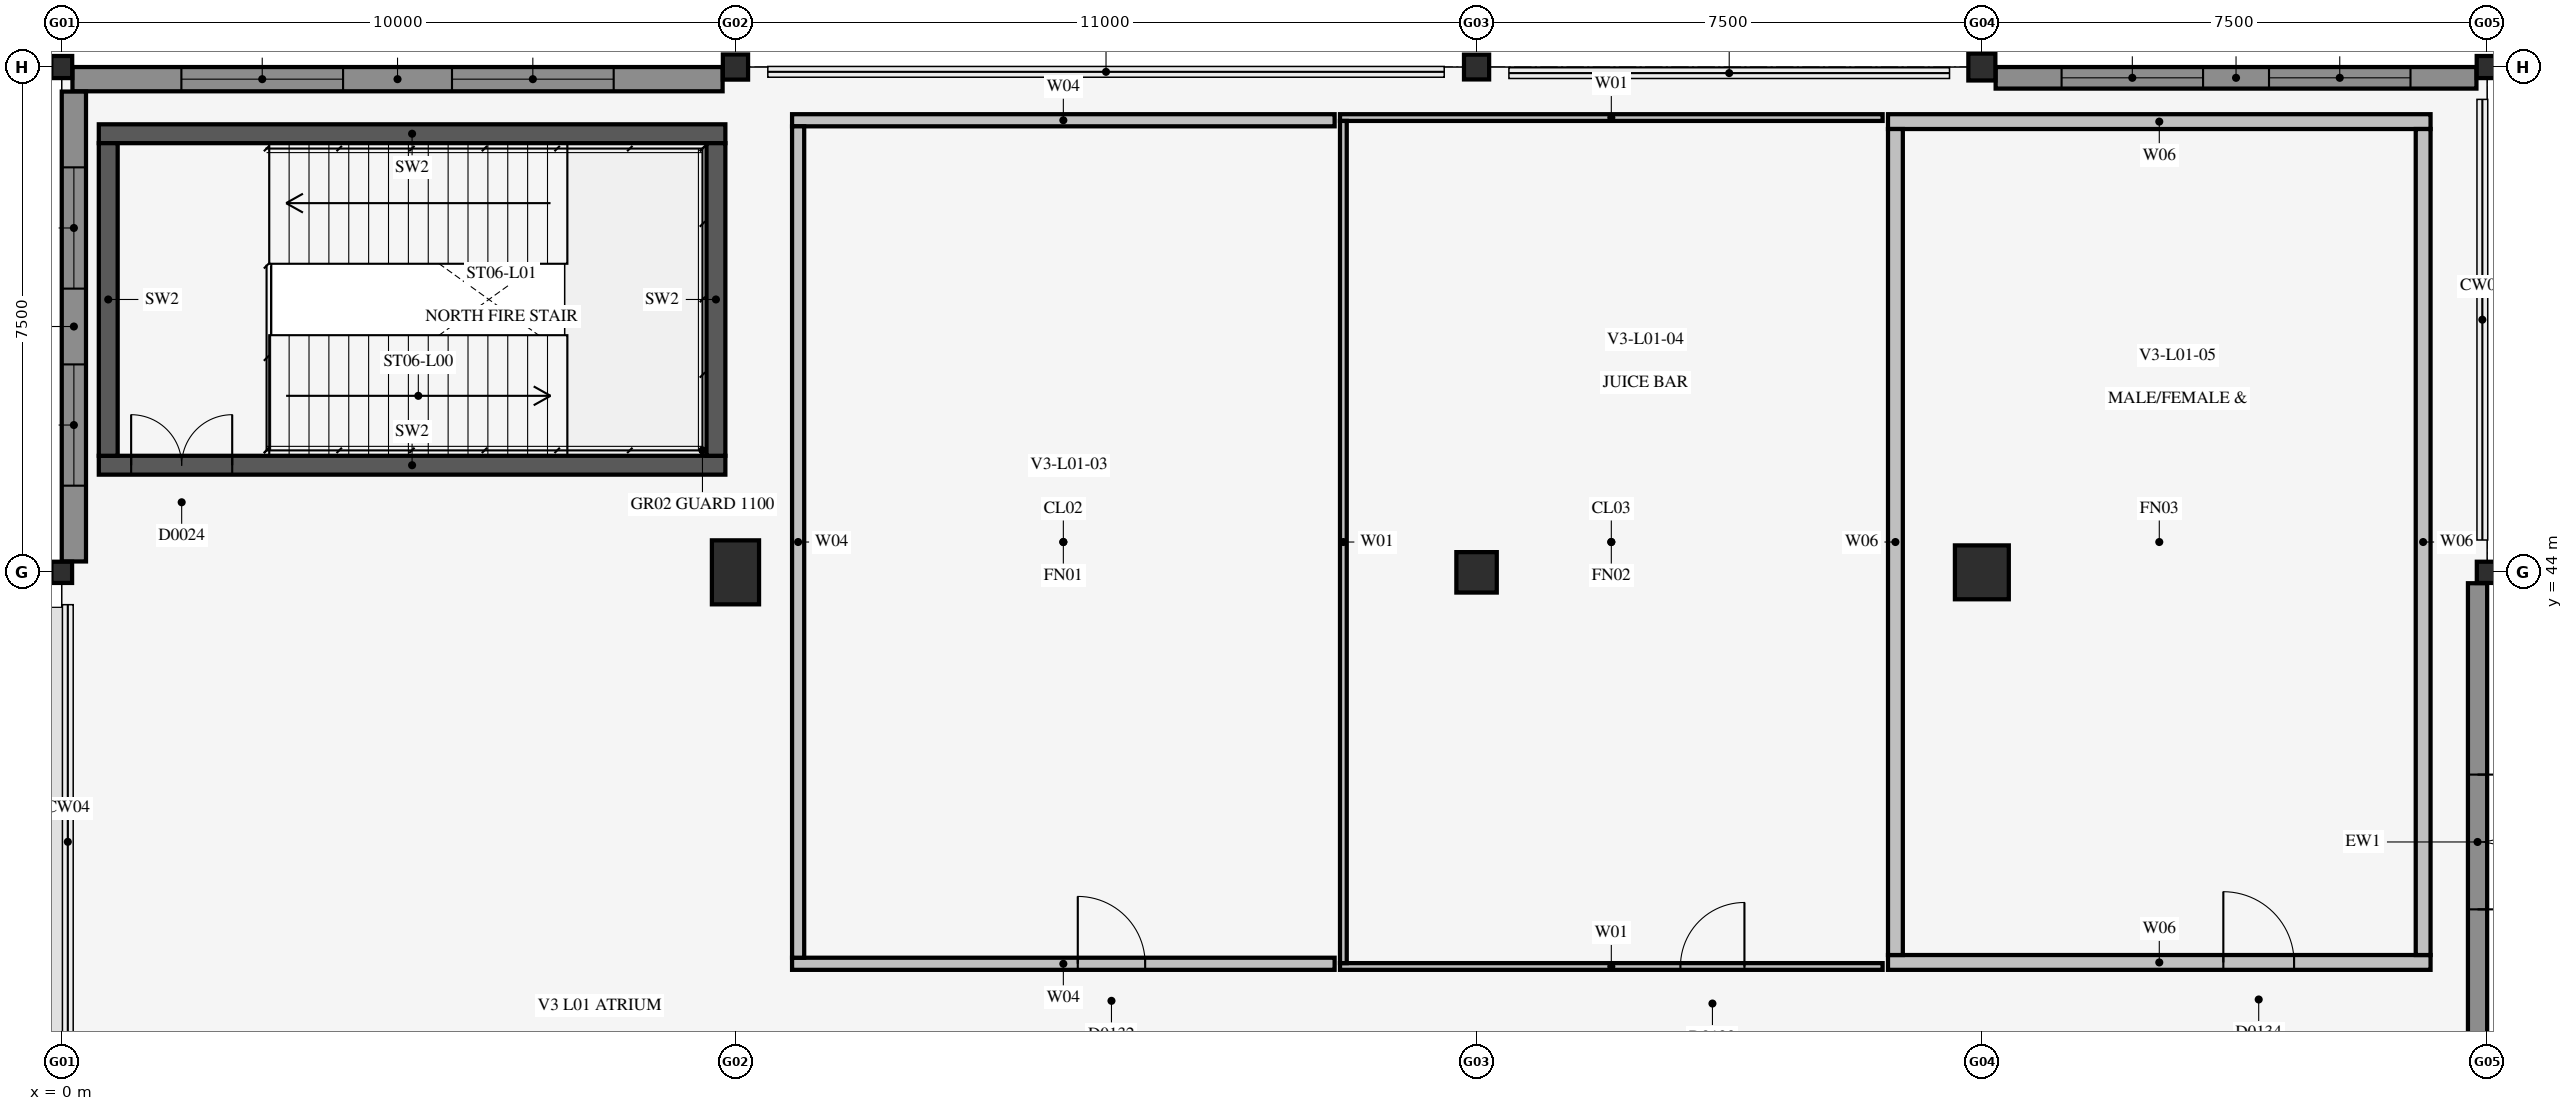
"""IFC4 building model, lengths in metres.
Left out: names, types, materials, properties, quantities, classifications, styles, units other than length and angle.
Written with IfcOpenShell. Run it as: python <this file> out.ifc"""

import sys

from ifc_helpers import new_model, si_unit, direction, frame, frame_2d, origin, origin_2d, place, context, subcontext, project, spatial, rectangle, circle, i_section, extrude, element, fill, save


model = new_model("IFC4")
c1 = context("Model", 3, precision=1e-05, world=origin(), true_north=direction((0.0, 1.0)))
c2 = subcontext(c1, "Body", "Model", "MODEL_VIEW")
j1 = project(units=[si_unit("LENGTHUNIT", "METRE"), si_unit("PLANEANGLEUNIT", "RADIAN")], contexts=[c1])
p1 = place(None, origin())
s1 = spatial("IfcSite", under=j1, at=p1, CompositionType="ELEMENT")
p2 = place(p1, origin())
s2 = spatial("IfcBuilding", under=s1, at=p2, CompositionType="ELEMENT")
p3 = place(p2, frame((0.0, 0.0, 5.4)))
s3 = spatial("IfcBuildingStorey", under=s2, at=p3, CompositionType="ELEMENT", Elevation=5.4)
p4 = place(p3, frame((0.55, 45.59, 0.0), z_axis=(0.0, 0.0, 1.0), x_axis=(1.0, 0.0, 0.0)))
e1 = element("IfcWall", 1, at=p4, inside=s3, PredefinedType="SHEAR", context=c2, shape_type="SweptSolid", body=[
    extrude(rectangle(XDim=9.3, YDim=0.28, at=frame_2d((4.65, 0.0))), origin(), (0.0, 0.0, 1.0), 4.635),
])
p5 = place(p4, frame((0.48, 0.0, 0.0)))
e2 = element("IfcOpeningElement", 2, at=p5, cuts=e1, PredefinedType="OPENING", context=c2, shape_type="SweptSolid", body=[
    extrude(rectangle(XDim=1.5, YDim=2.3, at=frame_2d((0.75, 1.15))), frame((0.0, 0.152, 0.0), z_axis=(0.0, -1.0, 0.0), x_axis=(1.0, 0.0, 0.0)), (0.0, 0.0, 1.0), 0.304),
])
p6 = place(p3, frame((0.55, 50.51, 0.0), z_axis=(0.0, 0.0, 1.0), x_axis=(1.0, 0.0, 0.0)))
e3 = element("IfcWall", 3, at=p6, inside=s3, PredefinedType="SHEAR", context=c2, shape_type="SweptSolid", body=[
    extrude(rectangle(XDim=9.3, YDim=0.28, at=frame_2d((4.65, 0.0))), origin(), (0.0, 0.0, 1.0), 4.635),
])
for number, where, z_axis, x_axis in (
    (4, (0.69, 45.73, 0.0), (0.0, 0.0, 1.0), (0.0, 1.0, 0.0)),
    (5, (9.71, 45.73, 0.0), (0.0, 0.0, 1.0), (0.0, 1.0, 0.0)),
):
    element("IfcWall", number, at=place(p3, frame(where, z_axis=z_axis, x_axis=x_axis)), inside=s3, PredefinedType="SHEAR", context=c2, shape_type="SweptSolid", body=[
        extrude(rectangle(XDim=4.64, YDim=0.28, at=frame_2d((2.32, 0.0))), origin(), (0.0, 0.0, 1.0), 4.635),
    ])
p7 = place(p3, frame((0.0, 44.0, 0.0), z_axis=(0.0, 0.0, 1.0), x_axis=(1.0, 0.0, 0.0)))
e6 = element("IfcColumn", 6, at=p7, inside=s3, PredefinedType="COLUMN", context=c2, shape_type="SweptSolid", body=[
    extrude(i_section(OverallWidth=0.307, OverallDepth=0.315, WebThickness=0.012, FlangeThickness=0.019, FilletRadius=0.014, at=origin_2d()), origin(), (0.0, 0.0, 1.0), 4.6),
])
p8 = place(p3, frame((0.0, 51.5, 0.0), z_axis=(0.0, 0.0, 1.0), x_axis=(1.0, 0.0, 0.0)))
e7 = element("IfcColumn", 7, at=p8, inside=s3, PredefinedType="COLUMN", context=c2, shape_type="SweptSolid", body=[
    extrude(i_section(OverallWidth=0.31, OverallDepth=0.328, WebThickness=0.015, FlangeThickness=0.025, FilletRadius=0.014, at=origin_2d()), origin(), (0.0, 0.0, 1.0), 4.6),
])
p9 = place(p3, frame((10.0, 44.0, 0.0), z_axis=(0.0, 0.0, 1.0), x_axis=(1.0, 0.0, 0.0)))
e8 = element("IfcColumn", 8, at=p9, inside=s3, PredefinedType="COLUMN", context=c2, shape_type="SweptSolid", body=[
    extrude(rectangle(XDim=0.7, YDim=0.95, at=origin_2d()), origin(), (0.0, 0.0, 1.0), 4.6),
])
p10 = place(p3, frame((10.0, 51.5, 0.0), z_axis=(0.0, 0.0, 1.0), x_axis=(1.0, 0.0, 0.0)))
e9 = element("IfcColumn", 9, at=p10, inside=s3, PredefinedType="COLUMN", context=c2, shape_type="SweptSolid", body=[
    extrude(i_section(OverallWidth=0.374, OverallDepth=0.373, WebThickness=0.016, FlangeThickness=0.026, FilletRadius=0.014, at=origin_2d()), origin(), (0.0, 0.0, 1.0), 4.6),
])
p11 = place(p3, frame((21.0, 44.0, 0.0), z_axis=(0.0, 0.0, 1.0), x_axis=(1.0, 0.0, 0.0)))
e10 = element("IfcColumn", 10, at=p11, inside=s3, PredefinedType="COLUMN", context=c2, shape_type="SweptSolid", body=[
    extrude(circle(Radius=0.3, at=origin_2d()), origin(), (0.0, 0.0, 1.0), 4.6),
])
p12 = place(p3, frame((21.0, 51.5, 0.0), z_axis=(0.0, 0.0, 1.0), x_axis=(1.0, 0.0, 0.0)))
e11 = element("IfcColumn", 11, at=p12, inside=s3, PredefinedType="COLUMN", context=c2, shape_type="SweptSolid", body=[
    extrude(i_section(OverallWidth=0.373, OverallDepth=0.368, WebThickness=0.015, FlangeThickness=0.024, FilletRadius=0.014, at=origin_2d()), origin(), (0.0, 0.0, 1.0), 4.6),
])
p13 = place(p3, frame((28.5, 44.0, 0.0), z_axis=(0.0, 0.0, 1.0), x_axis=(1.0, 0.0, 0.0)))
e12 = element("IfcColumn", 12, at=p13, inside=s3, PredefinedType="COLUMN", context=c2, shape_type="SweptSolid", body=[
    extrude(circle(Radius=0.4, at=origin_2d()), origin(), (0.0, 0.0, 1.0), 4.6),
])
p14 = place(p3, frame((28.5, 51.5, 0.0), z_axis=(0.0, 0.0, 1.0), x_axis=(1.0, 0.0, 0.0)))
e13 = element("IfcColumn", 13, at=p14, inside=s3, PredefinedType="COLUMN", context=c2, shape_type="SweptSolid", body=[
    extrude(i_section(OverallWidth=0.401, OverallDepth=0.399, WebThickness=0.025, FlangeThickness=0.04, FilletRadius=0.014, at=origin_2d()), origin(), (0.0, 0.0, 1.0), 4.6),
])
p15 = place(p3, frame((36.0, 44.0, 0.0), z_axis=(0.0, 0.0, 1.0), x_axis=(1.0, 0.0, 0.0)))
e14 = element("IfcColumn", 14, at=p15, inside=s3, PredefinedType="COLUMN", context=c2, shape_type="SweptSolid", body=[
    extrude(i_section(OverallWidth=0.307, OverallDepth=0.315, WebThickness=0.012, FlangeThickness=0.019, FilletRadius=0.014, at=origin_2d()), origin(), (0.0, 0.0, 1.0), 4.6),
])
p16 = place(p3, frame((36.0, 51.5, 0.0), z_axis=(0.0, 0.0, 1.0), x_axis=(1.0, 0.0, 0.0)))
e15 = element("IfcColumn", 15, at=p16, inside=s3, PredefinedType="COLUMN", context=c2, shape_type="SweptSolid", body=[
    extrude(i_section(OverallWidth=0.31, OverallDepth=0.328, WebThickness=0.015, FlangeThickness=0.025, FilletRadius=0.014, at=origin_2d()), origin(), (0.0, 0.0, 1.0), 4.6),
])
p17 = place(p3, frame((10.84, 38.19, 0.0), z_axis=(0.0, 0.0, 1.0), x_axis=(1.0, 0.0, 0.0)))
e16 = element("IfcWall", 16, at=p17, inside=s3, PredefinedType="PARTITIONING", context=c2, shape_type="SweptSolid", body=[
    extrude(rectangle(XDim=8.053, YDim=0.18, at=frame_2d((4.026, 0.0))), origin(), (0.0, 0.0, 1.0), 4.435),
])
p18 = place(p17, frame((4.241, 0.0, 0.0)))
e17 = element("IfcOpeningElement", 17, at=p18, cuts=e16, PredefinedType="OPENING", context=c2, shape_type="SweptSolid", body=[
    extrude(rectangle(XDim=1.0, YDim=2.2, at=frame_2d((0.5, 1.1))), frame((0.0, 0.102, 0.0), z_axis=(0.0, -1.0, 0.0), x_axis=(1.0, 0.0, 0.0)), (0.0, 0.0, 1.0), 0.204),
])
p19 = place(p3, frame((10.84, 50.71, 0.0), z_axis=(0.0, 0.0, 1.0), x_axis=(1.0, 0.0, 0.0)))
e18 = element("IfcWall", 18, at=p19, inside=s3, PredefinedType="PARTITIONING", context=c2, shape_type="SweptSolid", body=[
    extrude(rectangle(XDim=8.053, YDim=0.18, at=frame_2d((4.026, 0.0))), origin(), (0.0, 0.0, 1.0), 4.435),
])
p20 = place(p3, frame((10.93, 38.28, 0.0), z_axis=(0.0, 0.0, 1.0), x_axis=(0.0, 1.0, 0.0)))
e19 = element("IfcWall", 19, at=p20, inside=s3, PredefinedType="PARTITIONING", context=c2, shape_type="SweptSolid", body=[
    extrude(rectangle(XDim=12.34, YDim=0.18, at=frame_2d((6.17, 0.0))), origin(), (0.0, 0.0, 1.0), 4.435),
])
p21 = place(p3, frame((18.973, 38.15, 0.0), z_axis=(0.0, 0.0, 1.0), x_axis=(1.0, 0.0, 0.0)))
e20 = element("IfcWall", 20, at=p21, inside=s3, PredefinedType="PARTITIONING", context=c2, shape_type="SweptSolid", body=[
    extrude(rectangle(XDim=8.054, YDim=0.1, at=frame_2d((4.027, 0.0))), origin(), (0.0, 0.0, 1.0), 4.435),
])
p22 = place(p21, frame((5.053, 0.0, 0.0)))
e21 = element("IfcOpeningElement", 21, at=p22, cuts=e20, PredefinedType="OPENING", context=c2, shape_type="SweptSolid", body=[
    extrude(rectangle(XDim=0.95, YDim=2.15, at=frame_2d((0.475, 1.075))), frame((0.0, 0.062, 0.0), z_axis=(0.0, -1.0, 0.0), x_axis=(1.0, 0.0, 0.0)), (0.0, 0.0, 1.0), 0.124),
])
p23 = place(p3, frame((18.973, 50.75, 0.0), z_axis=(0.0, 0.0, 1.0), x_axis=(1.0, 0.0, 0.0)))
e22 = element("IfcWall", 22, at=p23, inside=s3, PredefinedType="PARTITIONING", context=c2, shape_type="SweptSolid", body=[
    extrude(rectangle(XDim=8.054, YDim=0.1, at=frame_2d((4.027, 0.0))), origin(), (0.0, 0.0, 1.0), 4.435),
])
p24 = place(p3, frame((19.023, 38.2, 0.0), z_axis=(0.0, 0.0, 1.0), x_axis=(0.0, 1.0, 0.0)))
e23 = element("IfcWall", 23, at=p24, inside=s3, PredefinedType="PARTITIONING", context=c2, shape_type="SweptSolid", body=[
    extrude(rectangle(XDim=12.5, YDim=0.1, at=frame_2d((6.25, 0.0))), origin(), (0.0, 0.0, 1.0), 4.435),
])
p25 = place(p3, frame((27.107, 38.21, 0.0), z_axis=(0.0, 0.0, 1.0), x_axis=(1.0, 0.0, 0.0)))
e24 = element("IfcWall", 24, at=p25, inside=s3, PredefinedType="PLUMBINGWALL", context=c2, shape_type="SweptSolid", body=[
    extrude(rectangle(XDim=8.053, YDim=0.22, at=frame_2d((4.026, 0.0))), origin(), (0.0, 0.0, 1.0), 4.435),
])
p26 = place(p25, frame((4.977, 0.0, 0.0)))
e25 = element("IfcOpeningElement", 25, at=p26, cuts=e24, PredefinedType="OPENING", context=c2, shape_type="SweptSolid", body=[
    extrude(rectangle(XDim=1.05, YDim=2.15, at=frame_2d((0.525, 1.075))), frame((0.0, 0.122, 0.0), z_axis=(0.0, -1.0, 0.0), x_axis=(1.0, 0.0, 0.0)), (0.0, 0.0, 1.0), 0.244),
])
p27 = place(p3, frame((27.107, 50.69, 0.0), z_axis=(0.0, 0.0, 1.0), x_axis=(1.0, 0.0, 0.0)))
e26 = element("IfcWall", 26, at=p27, inside=s3, PredefinedType="PLUMBINGWALL", context=c2, shape_type="SweptSolid", body=[
    extrude(rectangle(XDim=8.053, YDim=0.22, at=frame_2d((4.026, 0.0))), origin(), (0.0, 0.0, 1.0), 4.435),
])
for number, where, z_axis, x_axis in (
    (27, (35.05, 38.32, 0.0), (0.0, 0.0, 1.0), (0.0, 1.0, 0.0)),
    (28, (27.217, 38.32, 0.0), (0.0, 0.0, 1.0), (0.0, 1.0, 0.0)),
):
    element("IfcWall", number, at=place(p3, frame(where, z_axis=z_axis, x_axis=x_axis)), inside=s3, PredefinedType="PLUMBINGWALL", context=c2, shape_type="SweptSolid", body=[
        extrude(rectangle(XDim=12.26, YDim=0.22, at=frame_2d((6.13, 0.0))), origin(), (0.0, 0.0, 1.0), 4.435),
    ])
p28 = place(p3, frame((0.159, 51.32, 0.0), z_axis=(0.0, 0.0, 1.0), x_axis=(1.0, 0.0, 0.0)))
e29 = element("IfcWall", 29, at=p28, inside=s3, PredefinedType="SOLIDWALL", context=c2, shape_type="SweptSolid", body=[
    extrude(rectangle(XDim=9.65, YDim=0.36, at=frame_2d((4.825, 0.0))), origin(), (0.0, 0.0, 1.0), 3.958),
])
p29 = place(p28, frame((1.617, 0.0, 0.95)))
e30 = element("IfcOpeningElement", 30, at=p29, cuts=e29, PredefinedType="OPENING", context=c2, shape_type="SweptSolid", body=[
    extrude(rectangle(XDim=2.4, YDim=1.2, at=frame_2d((1.2, 0.6))), frame((0.0, 0.192, 0.0), z_axis=(0.0, -1.0, 0.0), x_axis=(1.0, 0.0, 0.0)), (0.0, 0.0, 1.0), 0.384),
])
p30 = place(p28, frame((5.633, 0.0, 0.95)))
e31 = element("IfcOpeningElement", 31, at=p30, cuts=e29, PredefinedType="OPENING", context=c2, shape_type="SweptSolid", body=[
    extrude(rectangle(XDim=2.4, YDim=1.2, at=frame_2d((1.2, 0.6))), frame((0.0, 0.192, 0.0), z_axis=(0.0, -1.0, 0.0), x_axis=(1.0, 0.0, 0.0)), (0.0, 0.0, 1.0), 0.384),
])
p31 = place(p3, frame((28.705, 51.34, 0.0), z_axis=(0.0, 0.0, 1.0), x_axis=(1.0, 0.0, 0.0)))
e32 = element("IfcWall", 32, at=p31, inside=s3, PredefinedType="SOLIDWALL", context=c2, shape_type="SweptSolid", body=[
    extrude(rectangle(XDim=7.136, YDim=0.32, at=frame_2d((3.568, 0.0))), origin(), (0.0, 0.0, 1.0), 4.034),
])
p32 = place(p31, frame((0.979, 0.0, 0.95)))
e33 = element("IfcOpeningElement", 33, at=p32, cuts=e32, PredefinedType="OPENING", context=c2, shape_type="SweptSolid", body=[
    extrude(rectangle(XDim=2.1, YDim=1.5, at=frame_2d((1.05, 0.75))), frame((0.0, 0.172, 0.0), z_axis=(0.0, -1.0, 0.0), x_axis=(1.0, 0.0, 0.0)), (0.0, 0.0, 1.0), 0.344),
])
p33 = place(p31, frame((4.058, 0.0, 0.95)))
e34 = element("IfcOpeningElement", 34, at=p33, cuts=e32, PredefinedType="OPENING", context=c2, shape_type="SweptSolid", body=[
    extrude(rectangle(XDim=2.1, YDim=1.5, at=frame_2d((1.05, 0.75))), frame((0.0, 0.172, 0.0), z_axis=(0.0, -1.0, 0.0), x_axis=(1.0, 0.0, 0.0)), (0.0, 0.0, 1.0), 0.344),
])
p34 = place(p3, frame((0.18, 44.162, 0.0), z_axis=(0.0, 0.0, 1.0), x_axis=(0.0, 1.0, 0.0)))
e35 = element("IfcWall", 35, at=p34, inside=s3, PredefinedType="SOLIDWALL", context=c2, shape_type="SweptSolid", body=[
    extrude(rectangle(XDim=6.974, YDim=0.36, at=frame_2d((3.487, 0.0))), origin(), (0.0, 0.0, 1.0), 3.958),
])
p35 = place(p34, frame((1.125, 0.0, 0.95)))
e36 = element("IfcOpeningElement", 36, at=p35, cuts=e35, PredefinedType="OPENING", context=c2, shape_type="SweptSolid", body=[
    extrude(rectangle(XDim=1.8, YDim=0.9, at=frame_2d((0.9, 0.45))), frame((0.0, 0.192, 0.0), z_axis=(0.0, -1.0, 0.0), x_axis=(1.0, 0.0, 0.0)), (0.0, 0.0, 1.0), 0.384),
])
p36 = place(p34, frame((4.05, 0.0, 0.95)))
e37 = element("IfcOpeningElement", 37, at=p36, cuts=e35, PredefinedType="OPENING", context=c2, shape_type="SweptSolid", body=[
    extrude(rectangle(XDim=1.8, YDim=0.9, at=frame_2d((0.9, 0.45))), frame((0.0, 0.192, 0.0), z_axis=(0.0, -1.0, 0.0), x_axis=(1.0, 0.0, 0.0)), (0.0, 0.0, 1.0), 0.384),
])
p37 = place(p3, frame((35.857, 36.157, 0.0), z_axis=(0.0, 0.0, 1.0), x_axis=(0.0, 1.0, 0.0)))
e38 = element("IfcWall", 38, at=p37, inside=s3, PredefinedType="SOLIDWALL", context=c2, shape_type="SweptSolid", body=[
    extrude(rectangle(XDim=7.681, YDim=0.285, at=frame_2d((3.84, 0.0))), origin(), (0.0, 0.0, 1.0), 4.034),
])
p38 = place(p37, frame((2.841, 0.0, 0.0)))
e39 = element("IfcOpeningElement", 39, at=p38, cuts=e38, PredefinedType="OPENING", context=c2, shape_type="SweptSolid", body=[
    extrude(rectangle(XDim=2.0, YDim=2.4, at=frame_2d((1.0, 1.2))), frame((0.0, 0.154, 0.0), z_axis=(0.0, -1.0, 0.0), x_axis=(1.0, 0.0, 0.0)), (0.0, 0.0, 1.0), 0.309),
])
p39 = place(p5, origin())
e40 = element("IfcDoor", 40, at=p39, inside=s3, OperationType="DOUBLE_DOOR_SINGLE_SWING", PredefinedType="DOOR", context=c2, shape_type="SweptSolid", body=[
    extrude(rectangle(XDim=1.5, YDim=2.3, at=frame_2d((0.75, 1.15))), frame((0.0, 0.025, 0.0), z_axis=(0.0, -1.0, 0.0), x_axis=(1.0, 0.0, 0.0)), (0.0, 0.0, 1.0), 0.05),
])
fill(e2, e40)
p40 = place(p18, origin())
e41 = element("IfcDoor", 41, at=p40, inside=s3, OperationType="SINGLE_SWING_LEFT", PredefinedType="DOOR", context=c2, shape_type="SweptSolid", body=[
    extrude(rectangle(XDim=1.0, YDim=2.2, at=frame_2d((0.5, 1.1))), frame((0.0, 0.025, 0.0), z_axis=(0.0, -1.0, 0.0), x_axis=(1.0, 0.0, 0.0)), (0.0, 0.0, 1.0), 0.05),
])
fill(e17, e41)
p41 = place(p22, origin())
e42 = element("IfcDoor", 42, at=p41, inside=s3, OperationType="SINGLE_SWING_RIGHT", PredefinedType="DOOR", context=c2, shape_type="SweptSolid", body=[
    extrude(rectangle(XDim=0.95, YDim=2.15, at=frame_2d((0.475, 1.075))), frame((0.0, 0.025, 0.0), z_axis=(0.0, -1.0, 0.0), x_axis=(1.0, 0.0, 0.0)), (0.0, 0.0, 1.0), 0.05),
])
fill(e21, e42)
p42 = place(p26, origin())
e43 = element("IfcDoor", 43, at=p42, inside=s3, OperationType="SINGLE_SWING_LEFT", PredefinedType="DOOR", context=c2, shape_type="SweptSolid", body=[
    extrude(rectangle(XDim=1.05, YDim=2.15, at=frame_2d((0.525, 1.075))), frame((0.0, 0.025, 0.0), z_axis=(0.0, -1.0, 0.0), x_axis=(1.0, 0.0, 0.0)), (0.0, 0.0, 1.0), 0.05),
])
fill(e25, e43)
p43 = place(p29, origin())
e44 = element("IfcWindow", 44, at=p43, inside=s3, PartitioningType="SINGLE_PANEL", PredefinedType="WINDOW", context=c2, shape_type="SweptSolid", body=[
    extrude(rectangle(XDim=2.4, YDim=1.2, at=frame_2d((1.2, 0.6))), frame((0.0, 0.03, 0.0), z_axis=(0.0, -1.0, 0.0), x_axis=(1.0, 0.0, 0.0)), (0.0, 0.0, 1.0), 0.06),
])
fill(e30, e44)
p44 = place(p30, origin())
e45 = element("IfcWindow", 45, at=p44, inside=s3, PartitioningType="SINGLE_PANEL", PredefinedType="WINDOW", context=c2, shape_type="SweptSolid", body=[
    extrude(rectangle(XDim=2.4, YDim=1.2, at=frame_2d((1.2, 0.6))), frame((0.0, 0.03, 0.0), z_axis=(0.0, -1.0, 0.0), x_axis=(1.0, 0.0, 0.0)), (0.0, 0.0, 1.0), 0.06),
])
fill(e31, e45)
p45 = place(p32, origin())
e46 = element("IfcWindow", 46, at=p45, inside=s3, PartitioningType="SINGLE_PANEL", PredefinedType="WINDOW", context=c2, shape_type="SweptSolid", body=[
    extrude(rectangle(XDim=2.1, YDim=1.5, at=frame_2d((1.05, 0.75))), frame((0.0, 0.03, 0.0), z_axis=(0.0, -1.0, 0.0), x_axis=(1.0, 0.0, 0.0)), (0.0, 0.0, 1.0), 0.06),
])
fill(e33, e46)
p46 = place(p33, origin())
e47 = element("IfcWindow", 47, at=p46, inside=s3, PartitioningType="SINGLE_PANEL", PredefinedType="WINDOW", context=c2, shape_type="SweptSolid", body=[
    extrude(rectangle(XDim=2.1, YDim=1.5, at=frame_2d((1.05, 0.75))), frame((0.0, 0.03, 0.0), z_axis=(0.0, -1.0, 0.0), x_axis=(1.0, 0.0, 0.0)), (0.0, 0.0, 1.0), 0.06),
])
fill(e34, e47)
p47 = place(p35, origin())
e48 = element("IfcWindow", 48, at=p47, inside=s3, PartitioningType="SINGLE_PANEL", PredefinedType="WINDOW", context=c2, shape_type="SweptSolid", body=[
    extrude(rectangle(XDim=1.8, YDim=0.9, at=frame_2d((0.9, 0.45))), frame((0.0, 0.03, 0.0), z_axis=(0.0, -1.0, 0.0), x_axis=(1.0, 0.0, 0.0)), (0.0, 0.0, 1.0), 0.06),
])
fill(e36, e48)
p48 = place(p36, origin())
e49 = element("IfcWindow", 49, at=p48, inside=s3, PartitioningType="SINGLE_PANEL", PredefinedType="WINDOW", context=c2, shape_type="SweptSolid", body=[
    extrude(rectangle(XDim=1.8, YDim=0.9, at=frame_2d((0.9, 0.45))), frame((0.0, 0.03, 0.0), z_axis=(0.0, -1.0, 0.0), x_axis=(1.0, 0.0, 0.0)), (0.0, 0.0, 1.0), 0.06),
])
fill(e37, e49)
p49 = place(p38, frame((2.0, 0.0, 0.0), z_axis=(0.0, 0.0, 1.0), x_axis=(-1.0, 0.0, 0.0)))
e50 = element("IfcDoor", 50, at=p49, inside=s3, OperationType="DOUBLE_DOOR_SINGLE_SWING", PredefinedType="DOOR", context=c2, shape_type="SweptSolid", body=[
    extrude(rectangle(XDim=2.0, YDim=2.4, at=frame_2d((1.0, 1.2))), frame((0.0, 0.025, 0.0), z_axis=(0.0, -1.0, 0.0), x_axis=(1.0, 0.0, 0.0)), (0.0, 0.0, 1.0), 0.05),
])
fill(e39, e50)
save(model, sys.argv[1])
